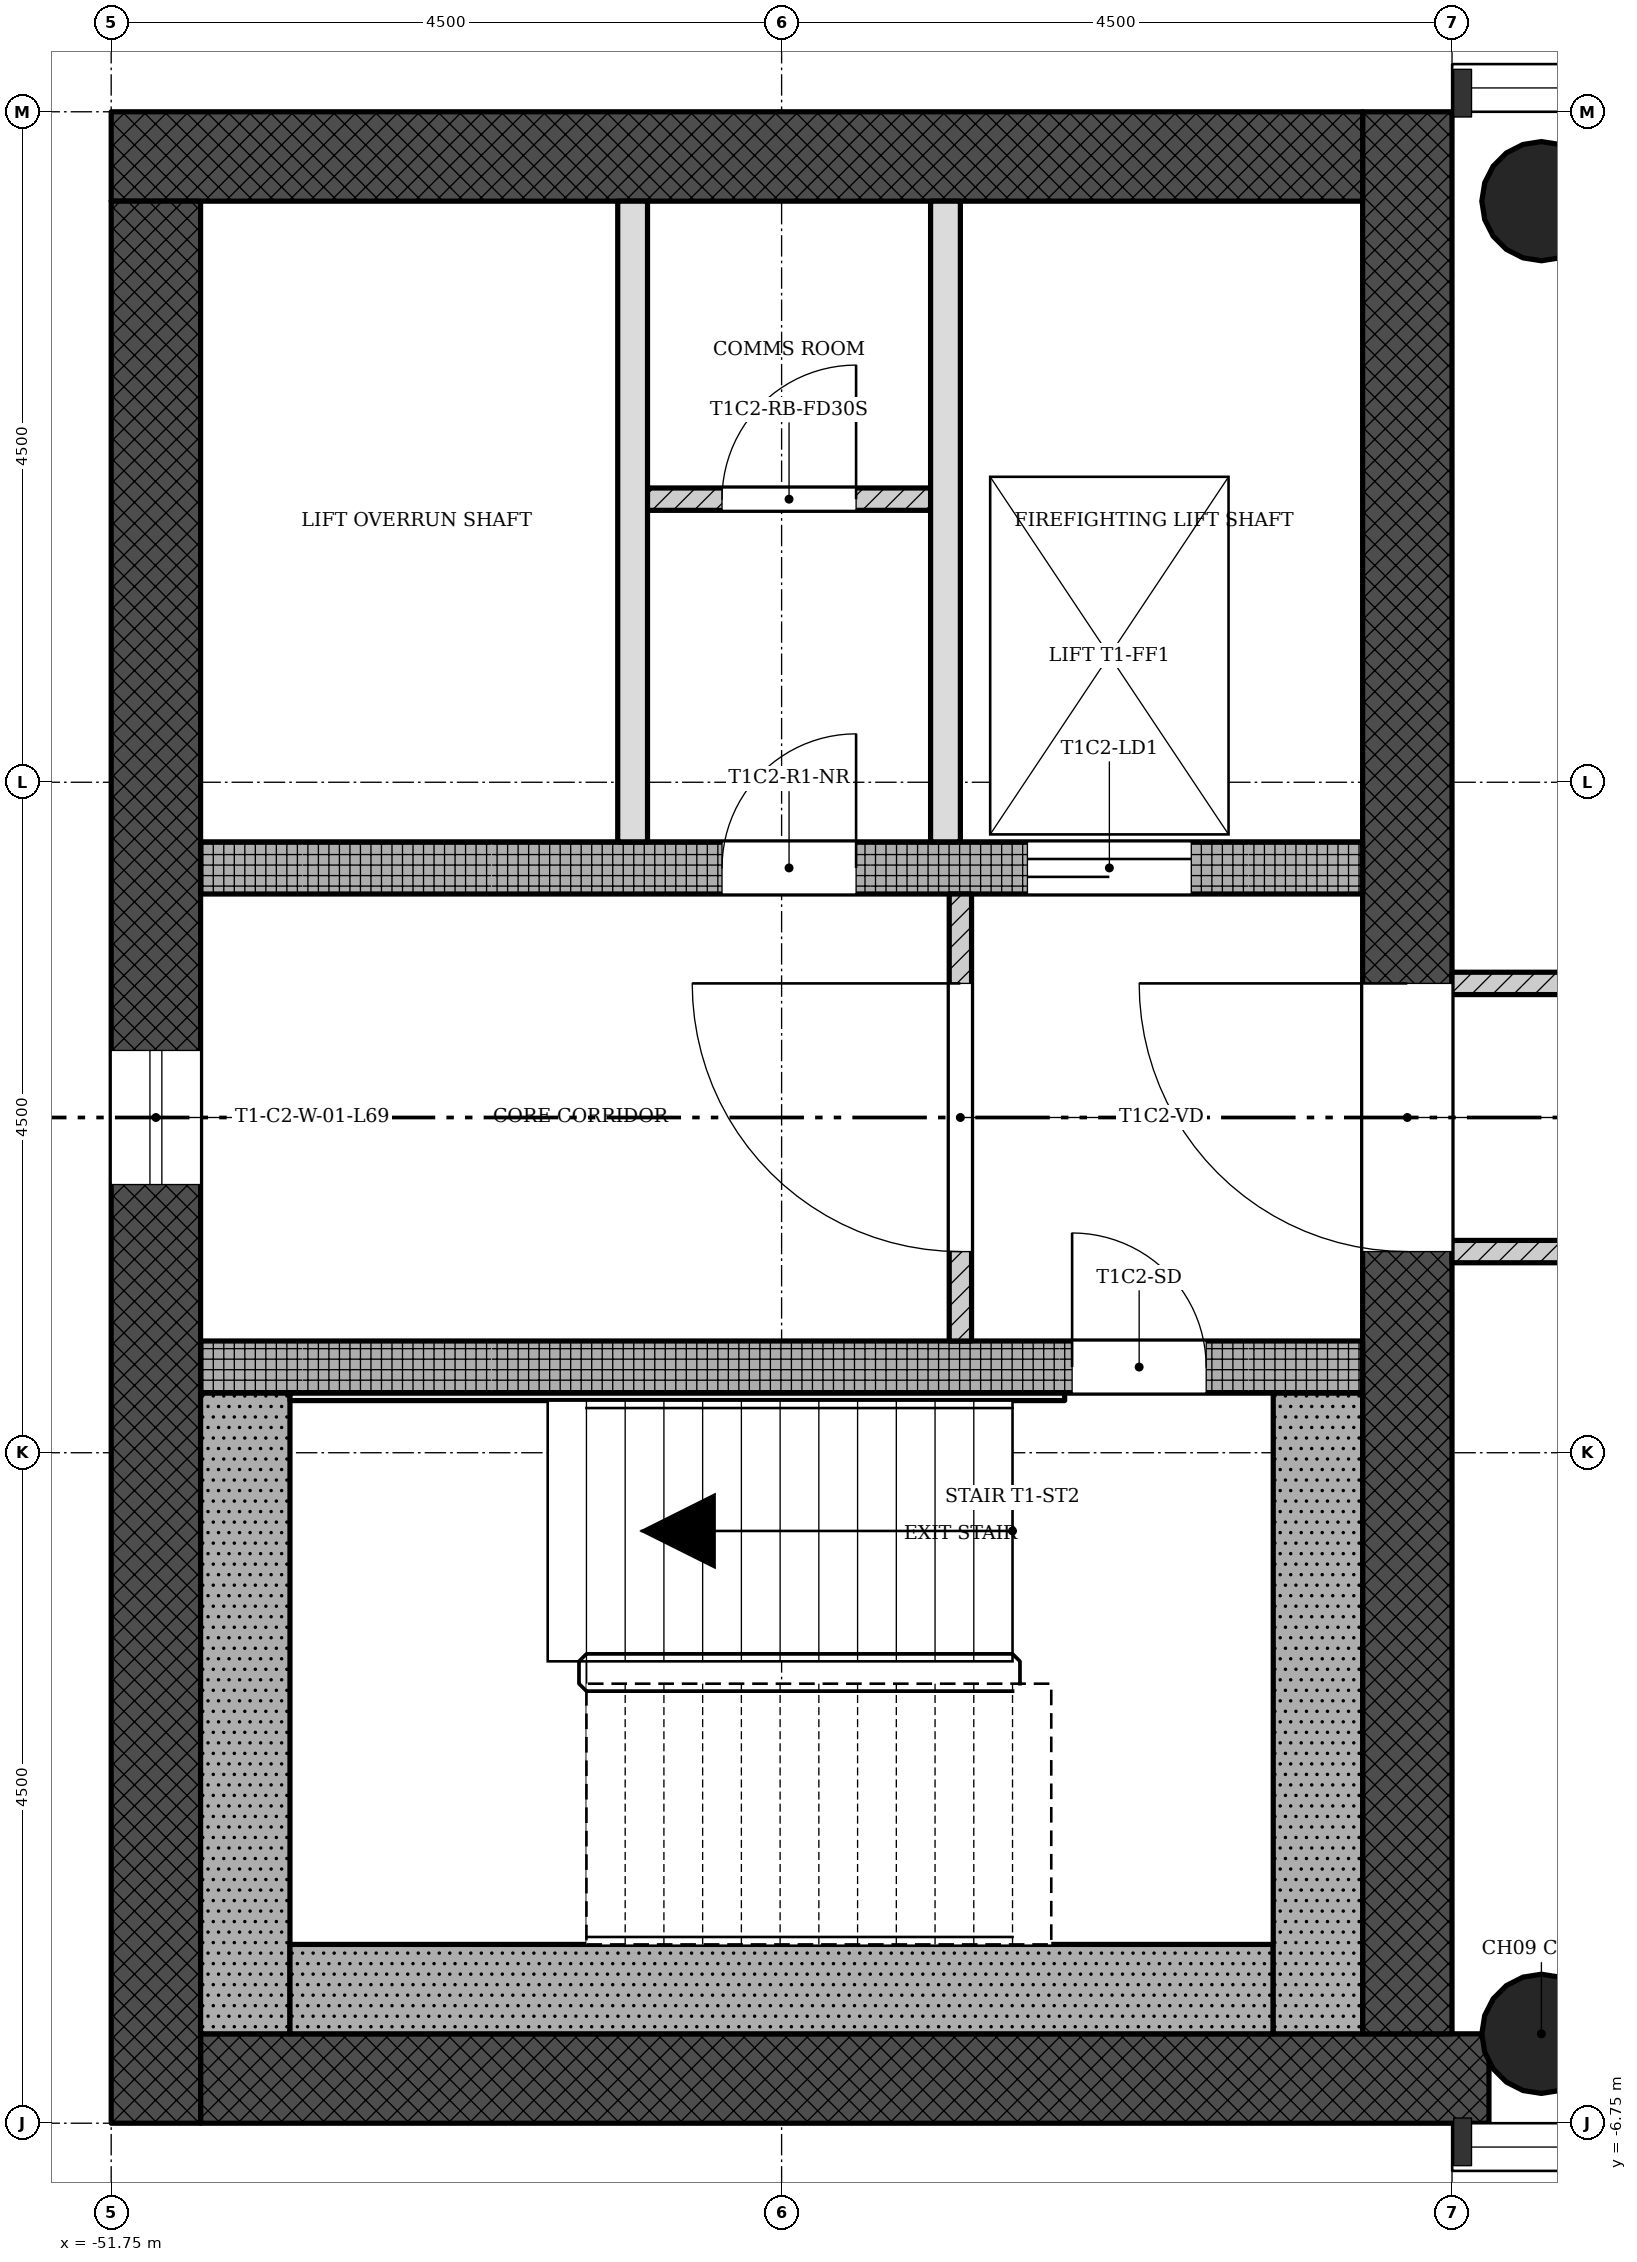
"""IFC4 building model, lengths in metres.
Left out: names, types, materials, properties, quantities, classifications, styles, units other than length and angle.
Written with IfcOpenShell. Run it as: python <this file> out.ifc"""

import sys

from ifc_helpers import new_model, si_unit, direction, frame, frame_2d, origin, origin_2d, place, context, subcontext, project, spatial, rectangle, hollow_circle, extrude, element, fill, save


model = new_model("IFC4")
c1 = context("Model", 3, precision=1e-05, world=origin(), true_north=direction((0.0, 1.0)))
c2 = subcontext(c1, "Body", "Model", "MODEL_VIEW")
j1 = project(units=[si_unit("LENGTHUNIT", "METRE"), si_unit("PLANEANGLEUNIT", "RADIAN")], contexts=[c1])
p1 = place(None, origin())
s1 = spatial("IfcSite", under=j1, at=p1, CompositionType="ELEMENT")
p2 = place(p1, origin())
s2 = spatial("IfcBuilding", under=s1, at=p2, CompositionType="ELEMENT")
p3 = place(p2, frame((0.0, 0.0, 251.4)))
s3 = spatial("IfcBuildingStorey", under=s2, at=p3, CompositionType="ELEMENT", Elevation=251.4)
p4 = place(p3, frame((-51.15, -6.45, 0.0), z_axis=(0.0, 0.0, 1.0), x_axis=(1.0, 0.0, 0.0)))
e1 = element("IfcWall", 1, at=p4, inside=s3, PredefinedType="SHEAR", context=c2, shape_type="SweptSolid", body=[
    extrude(rectangle(XDim=8.648, YDim=0.6, at=frame_2d((4.324, 0.0))), origin(), (0.0, 0.0, 1.0), 4.5),
])
p5 = place(p3, frame((-43.05, -6.15, 0.0), z_axis=(0.0, 0.0, 1.0), x_axis=(0.0, 1.0, 0.0)))
e2 = element("IfcWall", 2, at=p5, inside=s3, PredefinedType="SHEAR", context=c2, shape_type="SweptSolid", body=[
    extrude(rectangle(XDim=12.9, YDim=0.6, at=frame_2d((6.45, 0.0))), origin(), (0.0, 0.0, 1.0), 4.5),
])
p6 = place(p5, frame((5.25, 0.0, 0.0)))
e3 = element("IfcOpeningElement", 3, at=p6, cuts=e2, PredefinedType="OPENING", context=c2, shape_type="SweptSolid", body=[
    extrude(rectangle(XDim=1.8, YDim=2.1, at=frame_2d((0.9, 1.05))), frame((0.0, 0.31, 0.0), z_axis=(0.0, -1.0, 0.0), x_axis=(1.0, 0.0, 0.0)), (0.0, 0.0, 1.0), 0.62),
])
p7 = place(p3, frame((-43.35, 6.45, 0.0), z_axis=(0.0, 0.0, 1.0), x_axis=(-1.0, 0.0, 0.0)))
e4 = element("IfcWall", 4, at=p7, inside=s3, PredefinedType="SHEAR", context=c2, shape_type="SweptSolid", body=[
    extrude(rectangle(XDim=8.4, YDim=0.6, at=frame_2d((4.2, 0.0))), origin(), (0.0, 0.0, 1.0), 4.5),
])
p8 = place(p3, frame((-51.45, 6.15, 0.0), z_axis=(0.0, 0.0, 1.0), x_axis=(0.0, -1.0, 0.0)))
e5 = element("IfcWall", 5, at=p8, inside=s3, PredefinedType="SHEAR", context=c2, shape_type="SweptSolid", body=[
    extrude(rectangle(XDim=12.9, YDim=0.6, at=frame_2d((6.45, 0.0))), origin(), (0.0, 0.0, 1.0), 4.5),
])
p9 = place(p8, frame((5.7, 0.0, 0.45)))
e6 = element("IfcOpeningElement", 6, at=p9, cuts=e5, PredefinedType="OPENING", context=c2, shape_type="SweptSolid", body=[
    extrude(rectangle(XDim=0.9, YDim=2.4, at=frame_2d((0.45, 1.2))), frame((0.0, 0.31, 0.0), z_axis=(0.0, -1.0, 0.0), x_axis=(1.0, 0.0, 0.0)), (0.0, 0.0, 1.0), 0.62),
])
p10 = place(p3, frame((-51.15, -1.675, 0.0), z_axis=(0.0, 0.0, 1.0), x_axis=(1.0, 0.0, 0.0)))
e7 = element("IfcWall", 7, at=p10, inside=s3, PredefinedType="SHEAR", context=c2, shape_type="SweptSolid", body=[
    extrude(rectangle(XDim=7.8, YDim=0.35, at=frame_2d((3.9, 0.0))), origin(), (0.0, 0.0, 1.0), 4.5),
])
p11 = place(p10, frame((5.85, 0.0, 0.0)))
e8 = element("IfcOpeningElement", 8, at=p11, cuts=e7, PredefinedType="OPENING", context=c2, shape_type="SweptSolid", body=[
    extrude(rectangle(XDim=0.9, YDim=2.1, at=frame_2d((0.45, 1.05))), frame((0.0, 0.185, 0.0), z_axis=(0.0, -1.0, 0.0), x_axis=(1.0, 0.0, 0.0)), (0.0, 0.0, 1.0), 0.37),
])
p12 = place(p3, frame((-51.15, 1.675, 0.0), z_axis=(0.0, 0.0, 1.0), x_axis=(1.0, 0.0, 0.0)))
e9 = element("IfcWall", 9, at=p12, inside=s3, PredefinedType="SHEAR", context=c2, shape_type="SweptSolid", body=[
    extrude(rectangle(XDim=7.8, YDim=0.35, at=frame_2d((3.9, 0.0))), origin(), (0.0, 0.0, 1.0), 4.5),
])
p13 = place(p12, frame((5.55, 0.0, 0.0)))
e10 = element("IfcOpeningElement", 10, at=p13, cuts=e9, PredefinedType="OPENING", context=c2, shape_type="SweptSolid", body=[
    extrude(rectangle(XDim=1.1, YDim=2.1, at=frame_2d((0.55, 1.05))), frame((0.0, 0.185, 0.0), z_axis=(0.0, -1.0, 0.0), x_axis=(1.0, 0.0, 0.0)), (0.0, 0.0, 1.0), 0.37),
])
p14 = place(p12, frame((3.5, 0.0, 0.0)))
e11 = element("IfcOpeningElement", 11, at=p14, cuts=e9, PredefinedType="OPENING", context=c2, shape_type="SweptSolid", body=[
    extrude(rectangle(XDim=0.9, YDim=2.1, at=frame_2d((0.45, 1.05))), frame((0.0, 0.185, 0.0), z_axis=(0.0, -1.0, 0.0), x_axis=(1.0, 0.0, 0.0)), (0.0, 0.0, 1.0), 0.37),
])
for number, where, z_axis, x_axis in (
    (12, (-42.15, -6.15, 0.0), (0.0, 0.0, 1.0), (1.0, 0.0, 0.0)),
    (13, (-42.15, 6.15, 0.0), (0.0, 0.0, 1.0), (1.0, 0.0, 0.0)),
):
    element("IfcColumn", number, at=place(p3, frame(where, z_axis=z_axis, x_axis=x_axis)), inside=s3, PredefinedType="COLUMN", context=c2, shape_type="SweptSolid", body=[
        extrude(hollow_circle(Radius=0.4, WallThickness=0.028, at=origin_2d()), origin(), (0.0, 0.0, 1.0), 4.5),
    ])
p15 = place(p3, frame((-46.05, 1.5, 0.0), z_axis=(0.0, 0.0, 1.0), x_axis=(0.0, -1.0, 0.0)))
e14 = element("IfcWall", 14, at=p15, inside=s3, PredefinedType="PARTITIONING", context=c2, shape_type="SweptSolid", body=[
    extrude(rectangle(XDim=3.0, YDim=0.15, at=frame_2d((1.5, 0.0))), origin(), (0.0, 0.0, 1.0), 4.1),
])
p16 = place(p15, frame((0.6, 0.0, 0.0)))
e15 = element("IfcOpeningElement", 15, at=p16, cuts=e14, PredefinedType="OPENING", context=c2, shape_type="SweptSolid", body=[
    extrude(rectangle(XDim=1.8, YDim=2.1, at=frame_2d((0.9, 1.05))), frame((0.0, 0.085, 0.0), z_axis=(0.0, -1.0, 0.0), x_axis=(1.0, 0.0, 0.0)), (0.0, 0.0, 1.0), 0.17),
])
for number, where, z_axis, x_axis in (
    (16, (-48.25, 6.15, 0.0), (0.0, 0.0, 1.0), (0.0, -1.0, 0.0)),
    (17, (-46.15, 6.15, 0.0), (0.0, 0.0, 1.0), (0.0, -1.0, 0.0)),
):
    element("IfcWall", number, at=place(p3, frame(where, z_axis=z_axis, x_axis=x_axis)), inside=s3, PredefinedType="SOLIDWALL", context=c2, shape_type="SweptSolid", body=[
        extrude(rectangle(XDim=4.3, YDim=0.2, at=frame_2d((2.15, 0.0))), origin(), (0.0, 0.0, 1.0), 4.1),
    ])
p17 = place(p3, frame((-46.15, 4.15, 0.0), z_axis=(0.0, 0.0, 1.0), x_axis=(-1.0, 0.0, 0.0)))
e18 = element("IfcWall", 18, at=p17, inside=s3, PredefinedType="PARTITIONING", context=c2, shape_type="SweptSolid", body=[
    extrude(rectangle(XDim=2.1, YDim=0.15, at=frame_2d((1.05, 0.0))), origin(), (0.0, 0.0, 1.0), 4.1),
])
p18 = place(p17, frame((0.6, 0.0, 0.0)))
e19 = element("IfcOpeningElement", 19, at=p18, cuts=e18, PredefinedType="OPENING", context=c2, shape_type="SweptSolid", body=[
    extrude(rectangle(XDim=0.9, YDim=2.1, at=frame_2d((0.45, 1.05))), frame((0.0, 0.085, 0.0), z_axis=(0.0, -1.0, 0.0), x_axis=(1.0, 0.0, 0.0)), (0.0, 0.0, 1.0), 0.17),
])
p19 = place(p3, frame((-42.75, 0.9, 0.0), z_axis=(0.0, 0.0, 1.0), x_axis=(1.0, 0.0, 0.0)))
e20 = element("IfcWall", 20, at=p19, inside=s3, PredefinedType="PARTITIONING", context=c2, shape_type="SweptSolid", body=[
    extrude(rectangle(XDim=13.5, YDim=0.15, at=frame_2d((6.75, 0.0))), origin(), (0.0, 0.0, 1.0), 4.1),
])
p20 = place(p19, frame((4.05, 0.0, 0.0)))
e21 = element("IfcOpeningElement", 21, at=p20, cuts=e20, PredefinedType="OPENING", context=c2, shape_type="SweptSolid", body=[
    extrude(rectangle(XDim=0.9, YDim=2.1, at=frame_2d((0.45, 1.05))), frame((0.0, 0.085, 0.0), z_axis=(0.0, -1.0, 0.0), x_axis=(1.0, 0.0, 0.0)), (0.0, 0.0, 1.0), 0.17),
])
p21 = place(p19, frame((10.8, 0.0, 0.0)))
e22 = element("IfcOpeningElement", 22, at=p21, cuts=e20, PredefinedType="OPENING", context=c2, shape_type="SweptSolid", body=[
    extrude(rectangle(XDim=0.9, YDim=2.1, at=frame_2d((0.45, 1.05))), frame((0.0, 0.085, 0.0), z_axis=(0.0, -1.0, 0.0), x_axis=(1.0, 0.0, 0.0)), (0.0, 0.0, 1.0), 0.17),
])
p22 = place(p3, frame((-42.75, -0.9, 0.0), z_axis=(0.0, 0.0, 1.0), x_axis=(1.0, 0.0, 0.0)))
e23 = element("IfcWall", 23, at=p22, inside=s3, PredefinedType="PARTITIONING", context=c2, shape_type="SweptSolid", body=[
    extrude(rectangle(XDim=13.5, YDim=0.15, at=frame_2d((6.75, 0.0))), origin(), (0.0, 0.0, 1.0), 4.1),
])
p23 = place(p22, frame((4.05, 0.0, 0.0)))
e24 = element("IfcOpeningElement", 24, at=p23, cuts=e23, PredefinedType="OPENING", context=c2, shape_type="SweptSolid", body=[
    extrude(rectangle(XDim=0.9, YDim=2.1, at=frame_2d((0.45, 1.05))), frame((0.0, 0.085, 0.0), z_axis=(0.0, -1.0, 0.0), x_axis=(1.0, 0.0, 0.0)), (0.0, 0.0, 1.0), 0.17),
])
p24 = place(p22, frame((10.8, 0.0, 0.0)))
e25 = element("IfcOpeningElement", 25, at=p24, cuts=e23, PredefinedType="OPENING", context=c2, shape_type="SweptSolid", body=[
    extrude(rectangle(XDim=0.9, YDim=2.1, at=frame_2d((0.45, 1.05))), frame((0.0, 0.085, 0.0), z_axis=(0.0, -1.0, 0.0), x_axis=(1.0, 0.0, 0.0)), (0.0, 0.0, 1.0), 0.17),
])
p25 = place(p3, frame((-50.85, -1.85, 0.0), z_axis=(0.0, 0.0, 1.0), x_axis=(0.0, -1.0, 0.0)))
e26 = element("IfcWall", 26, at=p25, inside=s3, PredefinedType="SHEAR", context=c2, shape_type="SweptSolid", body=[
    extrude(rectangle(XDim=4.3, YDim=0.6, at=frame_2d((2.15, 0.0))), origin(), (0.0, 0.0, 1.0), 4.5),
])
p26 = place(p3, frame((-43.95, -5.85, 0.0), z_axis=(0.0, 0.0, 1.0), x_axis=(-1.0, 0.0, 0.0)))
e27 = element("IfcWall", 27, at=p26, inside=s3, PredefinedType="SHEAR", context=c2, shape_type="SweptSolid", body=[
    extrude(rectangle(XDim=6.6, YDim=0.6, at=frame_2d((3.3, 0.0))), origin(), (0.0, 0.0, 1.0), 4.5),
])
p27 = place(p3, frame((-43.65, -1.85, 0.0), z_axis=(0.0, 0.0, 1.0), x_axis=(0.0, -1.0, 0.0)))
e28 = element("IfcWall", 28, at=p27, inside=s3, PredefinedType="SHEAR", context=c2, shape_type="SweptSolid", body=[
    extrude(rectangle(XDim=4.3, YDim=0.6, at=frame_2d((2.15, 0.0))), origin(), (0.0, 0.0, 1.0), 4.5),
])
p28 = place(p3, frame((-45.35, -1.875, 0.0), z_axis=(0.0, 0.0, 1.0), x_axis=(-1.0, 0.0, 0.0)))
e29 = element("IfcWall", 29, at=p28, inside=s3, PredefinedType="SHEAR", context=c2, shape_type="SweptSolid", body=[
    extrude(rectangle(XDim=5.2, YDim=0.05, at=frame_2d((2.6, 0.0))), origin(), (0.0, 0.0, 1.0), 4.5),
])
p29 = place(p9, origin())
e30 = element("IfcWindow", 30, at=p29, inside=s3, PartitioningType="SINGLE_PANEL", PredefinedType="WINDOW", context=c2, shape_type="SweptSolid", body=[
    extrude(rectangle(XDim=0.9, YDim=2.4, at=frame_2d((0.45, 1.2))), frame((0.0, 0.03, 0.0), z_axis=(0.0, -1.0, 0.0), x_axis=(1.0, 0.0, 0.0)), (0.0, 0.0, 1.0), 0.06),
])
fill(e6, e30)
p30 = place(p16, origin())
e31 = element("IfcDoor", 31, at=p30, inside=s3, OperationType="SINGLE_SWING_LEFT", PredefinedType="DOOR", context=c2, shape_type="SweptSolid", body=[
    extrude(rectangle(XDim=1.8, YDim=2.1, at=frame_2d((0.9, 1.05))), frame((0.0, 0.025, 0.0), z_axis=(0.0, -1.0, 0.0), x_axis=(1.0, 0.0, 0.0)), (0.0, 0.0, 1.0), 0.05),
])
fill(e15, e31)
p31 = place(p18, origin())
e32 = element("IfcDoor", 32, at=p31, inside=s3, OperationType="SINGLE_SWING_LEFT", PredefinedType="DOOR", context=c2, shape_type="SweptSolid", body=[
    extrude(rectangle(XDim=0.9, YDim=2.1, at=frame_2d((0.45, 1.05))), frame((0.0, 0.025, 0.0), z_axis=(0.0, -1.0, 0.0), x_axis=(1.0, 0.0, 0.0)), (0.0, 0.0, 1.0), 0.05),
])
fill(e19, e32)
p32 = place(p11, origin())
e33 = element("IfcDoor", 33, at=p32, inside=s3, OperationType="SINGLE_SWING_RIGHT", PredefinedType="DOOR", context=c2, shape_type="SweptSolid", body=[
    extrude(rectangle(XDim=0.9, YDim=2.1, at=frame_2d((0.45, 1.05))), frame((0.0, 0.025, 0.0), z_axis=(0.0, -1.0, 0.0), x_axis=(1.0, 0.0, 0.0)), (0.0, 0.0, 1.0), 0.05),
])
fill(e8, e33)
p33 = place(p13, origin())
e34 = element("IfcDoor", 34, at=p33, inside=s3, OperationType="SLIDING_TO_LEFT", PredefinedType="DOOR", context=c2, shape_type="SweptSolid", body=[
    extrude(rectangle(XDim=1.1, YDim=2.1, at=frame_2d((0.55, 1.05))), frame((0.0, 0.025, 0.0), z_axis=(0.0, -1.0, 0.0), x_axis=(1.0, 0.0, 0.0)), (0.0, 0.0, 1.0), 0.05),
])
fill(e10, e34)
p34 = place(p14, origin())
e35 = element("IfcDoor", 35, at=p34, inside=s3, OperationType="SINGLE_SWING_LEFT", PredefinedType="DOOR", context=c2, shape_type="SweptSolid", body=[
    extrude(rectangle(XDim=0.9, YDim=2.1, at=frame_2d((0.45, 1.05))), frame((0.0, 0.025, 0.0), z_axis=(0.0, -1.0, 0.0), x_axis=(1.0, 0.0, 0.0)), (0.0, 0.0, 1.0), 0.05),
])
fill(e11, e35)
p35 = place(p6, origin())
e36 = element("IfcDoor", 36, at=p35, inside=s3, OperationType="SINGLE_SWING_LEFT", PredefinedType="DOOR", context=c2, shape_type="SweptSolid", body=[
    extrude(rectangle(XDim=1.8, YDim=2.1, at=frame_2d((0.9, 1.05))), frame((0.0, 0.025, 0.0), z_axis=(0.0, -1.0, 0.0), x_axis=(1.0, 0.0, 0.0)), (0.0, 0.0, 1.0), 0.05),
])
fill(e3, e36)
save(model, sys.argv[1])
